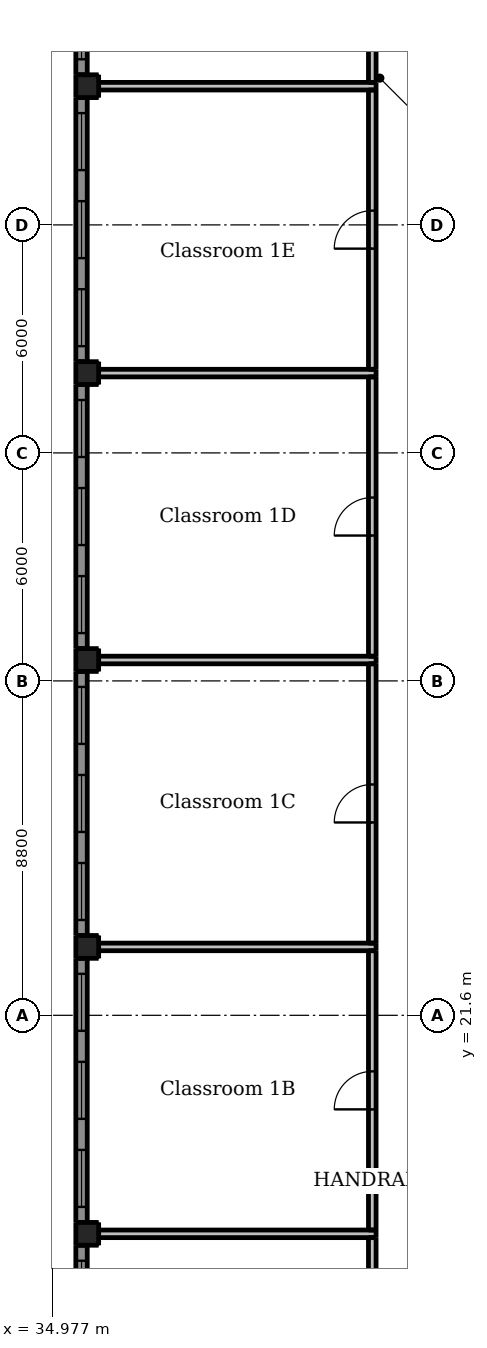
"""IFC4 building model, lengths in metres.
Left out: names, types, materials, properties, quantities, classifications, styles, units other than length and angle.
Written with IfcOpenShell. Run it as: python <this file> out.ifc"""

import sys

from ifc_helpers import new_model, si_unit, direction, frame, frame_2d, origin, origin_2d, place, context, subcontext, project, spatial, rectangle, extrude, element, fill, save


model = new_model("IFC4")
c1 = context("Model", 3, precision=1e-05, world=origin(), true_north=direction((0.0, 1.0)))
c2 = subcontext(c1, "Body", "Model", "MODEL_VIEW")
j1 = project(units=[si_unit("LENGTHUNIT", "METRE"), si_unit("PLANEANGLEUNIT", "RADIAN")], contexts=[c1])
p1 = place(None, origin())
s1 = spatial("IfcSite", under=j1, at=p1, CompositionType="ELEMENT")
p2 = place(p1, origin())
s2 = spatial("IfcBuilding", under=s1, at=p2, CompositionType="ELEMENT")
p3 = place(p2, frame((0.0, 0.0, 5.5)))
s3 = spatial("IfcBuildingStorey", under=s2, at=p3, CompositionType="ELEMENT", Elevation=5.5)
for number, where, z_axis, x_axis in (
    (1, (35.9, 15.85, -0.3), (0.0, 0.0, 1.0), (1.0, 0.0, 0.0)),
    (2, (35.9, 23.4, -0.3), (0.0, 0.0, 1.0), (1.0, 0.0, 0.0)),
    (3, (35.9, 30.95, -0.3), (0.0, 0.0, 1.0), (1.0, 0.0, 0.0)),
    (4, (35.9, 38.5, -0.3), (0.0, 0.0, 1.0), (1.0, 0.0, 0.0)),
    (5, (35.9, 46.05, -0.3), (0.0, 0.0, 1.0), (1.0, 0.0, 0.0)),
):
    element("IfcColumn", number, at=place(p3, frame(where, z_axis=z_axis, x_axis=x_axis)), inside=s3, PredefinedType="COLUMN", context=c2, shape_type="SweptSolid", body=[
        extrude(rectangle(XDim=0.6, YDim=0.6, at=origin_2d()), origin(), (0.0, 0.0, 1.0), 4.5),
    ])
p4 = place(p3, frame((35.75, 8.6, 0.0), z_axis=(0.0, 0.0, 1.0), x_axis=(0.0, 1.0, 0.0)))
e6 = element("IfcWall", 6, at=p4, inside=s3, PredefinedType="SOLIDWALL", context=c2, shape_type="SweptSolid", body=[
    extrude(rectangle(XDim=6.95, YDim=0.3, at=frame_2d((3.475, 0.0))), origin(), (0.0, 0.0, 1.0), 3.3),
])
p5 = place(p4, frame((0.408, 0.0, 0.9)))
e7 = element("IfcOpeningElement", 7, at=p5, cuts=e6, PredefinedType="OPENING", context=c2, shape_type="SweptSolid", body=[
    extrude(rectangle(XDim=1.5, YDim=1.5, at=frame_2d((0.75, 0.75))), frame((0.0, 0.16, 0.0), z_axis=(0.0, -1.0, 0.0), x_axis=(1.0, 0.0, 0.0)), (0.0, 0.0, 1.0), 0.32),
])
p6 = place(p4, frame((2.725, 0.0, 0.9)))
e8 = element("IfcOpeningElement", 8, at=p6, cuts=e6, PredefinedType="OPENING", context=c2, shape_type="SweptSolid", body=[
    extrude(rectangle(XDim=1.5, YDim=1.5, at=frame_2d((0.75, 0.75))), frame((0.0, 0.16, 0.0), z_axis=(0.0, -1.0, 0.0), x_axis=(1.0, 0.0, 0.0)), (0.0, 0.0, 1.0), 0.32),
])
p7 = place(p4, frame((5.042, 0.0, 0.9)))
e9 = element("IfcOpeningElement", 9, at=p7, cuts=e6, PredefinedType="OPENING", context=c2, shape_type="SweptSolid", body=[
    extrude(rectangle(XDim=1.5, YDim=1.5, at=frame_2d((0.75, 0.75))), frame((0.0, 0.16, 0.0), z_axis=(0.0, -1.0, 0.0), x_axis=(1.0, 0.0, 0.0)), (0.0, 0.0, 1.0), 0.32),
])
p8 = place(p3, frame((35.75, 16.15, 0.0), z_axis=(0.0, 0.0, 1.0), x_axis=(0.0, 1.0, 0.0)))
e10 = element("IfcWall", 10, at=p8, inside=s3, PredefinedType="SOLIDWALL", context=c2, shape_type="SweptSolid", body=[
    extrude(rectangle(XDim=6.95, YDim=0.3, at=frame_2d((3.475, 0.0))), origin(), (0.0, 0.0, 1.0), 3.3),
])
p9 = place(p8, frame((0.408, 0.0, 0.9)))
e11 = element("IfcOpeningElement", 11, at=p9, cuts=e10, PredefinedType="OPENING", context=c2, shape_type="SweptSolid", body=[
    extrude(rectangle(XDim=1.5, YDim=1.5, at=frame_2d((0.75, 0.75))), frame((0.0, 0.16, 0.0), z_axis=(0.0, -1.0, 0.0), x_axis=(1.0, 0.0, 0.0)), (0.0, 0.0, 1.0), 0.32),
])
p10 = place(p8, frame((2.725, 0.0, 0.9)))
e12 = element("IfcOpeningElement", 12, at=p10, cuts=e10, PredefinedType="OPENING", context=c2, shape_type="SweptSolid", body=[
    extrude(rectangle(XDim=1.5, YDim=1.5, at=frame_2d((0.75, 0.75))), frame((0.0, 0.16, 0.0), z_axis=(0.0, -1.0, 0.0), x_axis=(1.0, 0.0, 0.0)), (0.0, 0.0, 1.0), 0.32),
])
p11 = place(p8, frame((5.042, 0.0, 0.9)))
e13 = element("IfcOpeningElement", 13, at=p11, cuts=e10, PredefinedType="OPENING", context=c2, shape_type="SweptSolid", body=[
    extrude(rectangle(XDim=1.5, YDim=1.5, at=frame_2d((0.75, 0.75))), frame((0.0, 0.16, 0.0), z_axis=(0.0, -1.0, 0.0), x_axis=(1.0, 0.0, 0.0)), (0.0, 0.0, 1.0), 0.32),
])
p12 = place(p3, frame((35.75, 23.7, 0.0), z_axis=(0.0, 0.0, 1.0), x_axis=(0.0, 1.0, 0.0)))
e14 = element("IfcWall", 14, at=p12, inside=s3, PredefinedType="SOLIDWALL", context=c2, shape_type="SweptSolid", body=[
    extrude(rectangle(XDim=6.95, YDim=0.3, at=frame_2d((3.475, 0.0))), origin(), (0.0, 0.0, 1.0), 3.3),
])
p13 = place(p12, frame((0.408, 0.0, 0.9)))
e15 = element("IfcOpeningElement", 15, at=p13, cuts=e14, PredefinedType="OPENING", context=c2, shape_type="SweptSolid", body=[
    extrude(rectangle(XDim=1.5, YDim=1.5, at=frame_2d((0.75, 0.75))), frame((0.0, 0.16, 0.0), z_axis=(0.0, -1.0, 0.0), x_axis=(1.0, 0.0, 0.0)), (0.0, 0.0, 1.0), 0.32),
])
p14 = place(p12, frame((2.725, 0.0, 0.9)))
e16 = element("IfcOpeningElement", 16, at=p14, cuts=e14, PredefinedType="OPENING", context=c2, shape_type="SweptSolid", body=[
    extrude(rectangle(XDim=1.5, YDim=1.5, at=frame_2d((0.75, 0.75))), frame((0.0, 0.16, 0.0), z_axis=(0.0, -1.0, 0.0), x_axis=(1.0, 0.0, 0.0)), (0.0, 0.0, 1.0), 0.32),
])
p15 = place(p12, frame((5.042, 0.0, 0.9)))
e17 = element("IfcOpeningElement", 17, at=p15, cuts=e14, PredefinedType="OPENING", context=c2, shape_type="SweptSolid", body=[
    extrude(rectangle(XDim=1.5, YDim=1.5, at=frame_2d((0.75, 0.75))), frame((0.0, 0.16, 0.0), z_axis=(0.0, -1.0, 0.0), x_axis=(1.0, 0.0, 0.0)), (0.0, 0.0, 1.0), 0.32),
])
p16 = place(p3, frame((35.75, 31.25, 0.0), z_axis=(0.0, 0.0, 1.0), x_axis=(0.0, 1.0, 0.0)))
e18 = element("IfcWall", 18, at=p16, inside=s3, PredefinedType="SOLIDWALL", context=c2, shape_type="SweptSolid", body=[
    extrude(rectangle(XDim=6.95, YDim=0.3, at=frame_2d((3.475, 0.0))), origin(), (0.0, 0.0, 1.0), 3.3),
])
p17 = place(p16, frame((0.408, 0.0, 0.9)))
e19 = element("IfcOpeningElement", 19, at=p17, cuts=e18, PredefinedType="OPENING", context=c2, shape_type="SweptSolid", body=[
    extrude(rectangle(XDim=1.5, YDim=1.5, at=frame_2d((0.75, 0.75))), frame((0.0, 0.16, 0.0), z_axis=(0.0, -1.0, 0.0), x_axis=(1.0, 0.0, 0.0)), (0.0, 0.0, 1.0), 0.32),
])
p18 = place(p16, frame((2.725, 0.0, 0.9)))
e20 = element("IfcOpeningElement", 20, at=p18, cuts=e18, PredefinedType="OPENING", context=c2, shape_type="SweptSolid", body=[
    extrude(rectangle(XDim=1.5, YDim=1.5, at=frame_2d((0.75, 0.75))), frame((0.0, 0.16, 0.0), z_axis=(0.0, -1.0, 0.0), x_axis=(1.0, 0.0, 0.0)), (0.0, 0.0, 1.0), 0.32),
])
p19 = place(p16, frame((5.042, 0.0, 0.9)))
e21 = element("IfcOpeningElement", 21, at=p19, cuts=e18, PredefinedType="OPENING", context=c2, shape_type="SweptSolid", body=[
    extrude(rectangle(XDim=1.5, YDim=1.5, at=frame_2d((0.75, 0.75))), frame((0.0, 0.16, 0.0), z_axis=(0.0, -1.0, 0.0), x_axis=(1.0, 0.0, 0.0)), (0.0, 0.0, 1.0), 0.32),
])
p20 = place(p3, frame((35.75, 38.8, 0.0), z_axis=(0.0, 0.0, 1.0), x_axis=(0.0, 1.0, 0.0)))
e22 = element("IfcWall", 22, at=p20, inside=s3, PredefinedType="SOLIDWALL", context=c2, shape_type="SweptSolid", body=[
    extrude(rectangle(XDim=6.95, YDim=0.3, at=frame_2d((3.475, 0.0))), origin(), (0.0, 0.0, 1.0), 3.3),
])
p21 = place(p20, frame((0.408, 0.0, 0.9)))
e23 = element("IfcOpeningElement", 23, at=p21, cuts=e22, PredefinedType="OPENING", context=c2, shape_type="SweptSolid", body=[
    extrude(rectangle(XDim=1.5, YDim=1.5, at=frame_2d((0.75, 0.75))), frame((0.0, 0.16, 0.0), z_axis=(0.0, -1.0, 0.0), x_axis=(1.0, 0.0, 0.0)), (0.0, 0.0, 1.0), 0.32),
])
p22 = place(p20, frame((2.725, 0.0, 0.9)))
e24 = element("IfcOpeningElement", 24, at=p22, cuts=e22, PredefinedType="OPENING", context=c2, shape_type="SweptSolid", body=[
    extrude(rectangle(XDim=1.5, YDim=1.5, at=frame_2d((0.75, 0.75))), frame((0.0, 0.16, 0.0), z_axis=(0.0, -1.0, 0.0), x_axis=(1.0, 0.0, 0.0)), (0.0, 0.0, 1.0), 0.32),
])
p23 = place(p20, frame((5.042, 0.0, 0.9)))
e25 = element("IfcOpeningElement", 25, at=p23, cuts=e22, PredefinedType="OPENING", context=c2, shape_type="SweptSolid", body=[
    extrude(rectangle(XDim=1.5, YDim=1.5, at=frame_2d((0.75, 0.75))), frame((0.0, 0.16, 0.0), z_axis=(0.0, -1.0, 0.0), x_axis=(1.0, 0.0, 0.0)), (0.0, 0.0, 1.0), 0.32),
])
p24 = place(p3, frame((35.75, 46.35, 0.0), z_axis=(0.0, 0.0, 1.0), x_axis=(0.0, 1.0, 0.0)))
e26 = element("IfcWall", 26, at=p24, inside=s3, PredefinedType="SOLIDWALL", context=c2, shape_type="SweptSolid", body=[
    extrude(rectangle(XDim=6.95, YDim=0.3, at=frame_2d((3.475, 0.0))), origin(), (0.0, 0.0, 1.0), 3.3),
])
p25 = place(p24, frame((0.408, 0.0, 0.9)))
e27 = element("IfcOpeningElement", 27, at=p25, cuts=e26, PredefinedType="OPENING", context=c2, shape_type="SweptSolid", body=[
    extrude(rectangle(XDim=1.5, YDim=1.5, at=frame_2d((0.75, 0.75))), frame((0.0, 0.16, 0.0), z_axis=(0.0, -1.0, 0.0), x_axis=(1.0, 0.0, 0.0)), (0.0, 0.0, 1.0), 0.32),
])
p26 = place(p24, frame((2.725, 0.0, 0.9)))
e28 = element("IfcOpeningElement", 28, at=p26, cuts=e26, PredefinedType="OPENING", context=c2, shape_type="SweptSolid", body=[
    extrude(rectangle(XDim=1.5, YDim=1.5, at=frame_2d((0.75, 0.75))), frame((0.0, 0.16, 0.0), z_axis=(0.0, -1.0, 0.0), x_axis=(1.0, 0.0, 0.0)), (0.0, 0.0, 1.0), 0.32),
])
p27 = place(p24, frame((5.042, 0.0, 0.9)))
e29 = element("IfcOpeningElement", 29, at=p27, cuts=e26, PredefinedType="OPENING", context=c2, shape_type="SweptSolid", body=[
    extrude(rectangle(XDim=1.5, YDim=1.5, at=frame_2d((0.75, 0.75))), frame((0.0, 0.16, 0.0), z_axis=(0.0, -1.0, 0.0), x_axis=(1.0, 0.0, 0.0)), (0.0, 0.0, 1.0), 0.32),
])
p28 = place(p3, frame((43.4, 8.3, 0.0), z_axis=(0.0, 0.0, 1.0), x_axis=(0.0, 1.0, 0.0)))
e30 = element("IfcWall", 30, at=p28, inside=s3, PredefinedType="PARTITIONING", context=c2, shape_type="SweptSolid", body=[
    extrude(rectangle(XDim=7.45, YDim=0.2, at=frame_2d((3.725, 0.0))), origin(), (0.0, 0.0, 1.0), 3.1),
])
p29 = place(p28, frame((3.225, 0.0, 0.0)))
e31 = element("IfcOpeningElement", 31, at=p29, cuts=e30, PredefinedType="OPENING", context=c2, shape_type="SweptSolid", body=[
    extrude(rectangle(XDim=1.0, YDim=2.1, at=frame_2d((0.5, 1.05))), frame((0.0, 0.11, 0.0), z_axis=(0.0, -1.0, 0.0), x_axis=(1.0, 0.0, 0.0)), (0.0, 0.0, 1.0), 0.22),
])
p30 = place(p3, frame((43.4, 15.95, 0.0), z_axis=(0.0, 0.0, 1.0), x_axis=(0.0, 1.0, 0.0)))
e32 = element("IfcWall", 32, at=p30, inside=s3, PredefinedType="PARTITIONING", context=c2, shape_type="SweptSolid", body=[
    extrude(rectangle(XDim=7.35, YDim=0.2, at=frame_2d((3.675, 0.0))), origin(), (0.0, 0.0, 1.0), 3.1),
])
p31 = place(p30, frame((3.175, 0.0, 0.0)))
e33 = element("IfcOpeningElement", 33, at=p31, cuts=e32, PredefinedType="OPENING", context=c2, shape_type="SweptSolid", body=[
    extrude(rectangle(XDim=1.0, YDim=2.1, at=frame_2d((0.5, 1.05))), frame((0.0, 0.11, 0.0), z_axis=(0.0, -1.0, 0.0), x_axis=(1.0, 0.0, 0.0)), (0.0, 0.0, 1.0), 0.22),
])
p32 = place(p3, frame((43.4, 23.5, 0.0), z_axis=(0.0, 0.0, 1.0), x_axis=(0.0, 1.0, 0.0)))
e34 = element("IfcWall", 34, at=p32, inside=s3, PredefinedType="PARTITIONING", context=c2, shape_type="SweptSolid", body=[
    extrude(rectangle(XDim=7.35, YDim=0.2, at=frame_2d((3.675, 0.0))), origin(), (0.0, 0.0, 1.0), 3.1),
])
p33 = place(p32, frame((3.175, 0.0, 0.0)))
e35 = element("IfcOpeningElement", 35, at=p33, cuts=e34, PredefinedType="OPENING", context=c2, shape_type="SweptSolid", body=[
    extrude(rectangle(XDim=1.0, YDim=2.1, at=frame_2d((0.5, 1.05))), frame((0.0, 0.11, 0.0), z_axis=(0.0, -1.0, 0.0), x_axis=(1.0, 0.0, 0.0)), (0.0, 0.0, 1.0), 0.22),
])
p34 = place(p3, frame((43.4, 31.05, 0.0), z_axis=(0.0, 0.0, 1.0), x_axis=(0.0, 1.0, 0.0)))
e36 = element("IfcWall", 36, at=p34, inside=s3, PredefinedType="PARTITIONING", context=c2, shape_type="SweptSolid", body=[
    extrude(rectangle(XDim=7.35, YDim=0.2, at=frame_2d((3.675, 0.0))), origin(), (0.0, 0.0, 1.0), 3.1),
])
p35 = place(p34, frame((3.175, 0.0, 0.0)))
e37 = element("IfcOpeningElement", 37, at=p35, cuts=e36, PredefinedType="OPENING", context=c2, shape_type="SweptSolid", body=[
    extrude(rectangle(XDim=1.0, YDim=2.1, at=frame_2d((0.5, 1.05))), frame((0.0, 0.11, 0.0), z_axis=(0.0, -1.0, 0.0), x_axis=(1.0, 0.0, 0.0)), (0.0, 0.0, 1.0), 0.22),
])
p36 = place(p3, frame((43.4, 38.6, 0.0), z_axis=(0.0, 0.0, 1.0), x_axis=(0.0, 1.0, 0.0)))
e38 = element("IfcWall", 38, at=p36, inside=s3, PredefinedType="PARTITIONING", context=c2, shape_type="SweptSolid", body=[
    extrude(rectangle(XDim=7.35, YDim=0.2, at=frame_2d((3.675, 0.0))), origin(), (0.0, 0.0, 1.0), 3.1),
])
p37 = place(p36, frame((3.175, 0.0, 0.0)))
e39 = element("IfcOpeningElement", 39, at=p37, cuts=e38, PredefinedType="OPENING", context=c2, shape_type="SweptSolid", body=[
    extrude(rectangle(XDim=1.0, YDim=2.1, at=frame_2d((0.5, 1.05))), frame((0.0, 0.11, 0.0), z_axis=(0.0, -1.0, 0.0), x_axis=(1.0, 0.0, 0.0)), (0.0, 0.0, 1.0), 0.22),
])
p38 = place(p3, frame((43.4, 46.15, 0.0), z_axis=(0.0, 0.0, 1.0), x_axis=(0.0, 1.0, 0.0)))
e40 = element("IfcWall", 40, at=p38, inside=s3, PredefinedType="PARTITIONING", context=c2, shape_type="SweptSolid", body=[
    extrude(rectangle(XDim=7.35, YDim=0.2, at=frame_2d((3.675, 0.0))), origin(), (0.0, 0.0, 1.0), 3.1),
])
p39 = place(p38, frame((3.175, 0.0, 0.0)))
e41 = element("IfcOpeningElement", 41, at=p39, cuts=e40, PredefinedType="OPENING", context=c2, shape_type="SweptSolid", body=[
    extrude(rectangle(XDim=1.0, YDim=2.1, at=frame_2d((0.5, 1.05))), frame((0.0, 0.11, 0.0), z_axis=(0.0, -1.0, 0.0), x_axis=(1.0, 0.0, 0.0)), (0.0, 0.0, 1.0), 0.22),
])
for number, where, z_axis, x_axis in (
    (42, (36.2, 15.85, 0.0), (0.0, 0.0, 1.0), (1.0, 0.0, 0.0)),
    (43, (36.2, 23.4, 0.0), (0.0, 0.0, 1.0), (1.0, 0.0, 0.0)),
    (44, (36.2, 30.95, 0.0), (0.0, 0.0, 1.0), (1.0, 0.0, 0.0)),
    (45, (36.2, 38.5, 0.0), (0.0, 0.0, 1.0), (1.0, 0.0, 0.0)),
    (46, (36.2, 46.05, 0.0), (0.0, 0.0, 1.0), (1.0, 0.0, 0.0)),
):
    element("IfcWall", number, at=place(p3, frame(where, z_axis=z_axis, x_axis=x_axis)), inside=s3, PredefinedType="PARTITIONING", context=c2, shape_type="SweptSolid", body=[
        extrude(rectangle(XDim=7.3, YDim=0.2, at=frame_2d((3.65, 0.0))), origin(), (0.0, 0.0, 1.0), 3.1),
    ])
p40 = place(p7, origin())
e47 = element("IfcWindow", 47, at=p40, inside=s3, PartitioningType="DOUBLE_PANEL_HORIZONTAL", PredefinedType="WINDOW", context=c2, shape_type="SweptSolid", body=[
    extrude(rectangle(XDim=1.5, YDim=1.5, at=frame_2d((0.75, 0.75))), frame((0.0, 0.03, 0.0), z_axis=(0.0, -1.0, 0.0), x_axis=(1.0, 0.0, 0.0)), (0.0, 0.0, 1.0), 0.06),
])
fill(e9, e47)
p41 = place(p9, origin())
e48 = element("IfcWindow", 48, at=p41, inside=s3, PartitioningType="DOUBLE_PANEL_HORIZONTAL", PredefinedType="WINDOW", context=c2, shape_type="SweptSolid", body=[
    extrude(rectangle(XDim=1.5, YDim=1.5, at=frame_2d((0.75, 0.75))), frame((0.0, 0.03, 0.0), z_axis=(0.0, -1.0, 0.0), x_axis=(1.0, 0.0, 0.0)), (0.0, 0.0, 1.0), 0.06),
])
fill(e11, e48)
p42 = place(p10, origin())
e49 = element("IfcWindow", 49, at=p42, inside=s3, PartitioningType="DOUBLE_PANEL_HORIZONTAL", PredefinedType="WINDOW", context=c2, shape_type="SweptSolid", body=[
    extrude(rectangle(XDim=1.5, YDim=1.5, at=frame_2d((0.75, 0.75))), frame((0.0, 0.03, 0.0), z_axis=(0.0, -1.0, 0.0), x_axis=(1.0, 0.0, 0.0)), (0.0, 0.0, 1.0), 0.06),
])
fill(e12, e49)
p43 = place(p11, origin())
e50 = element("IfcWindow", 50, at=p43, inside=s3, PartitioningType="DOUBLE_PANEL_HORIZONTAL", PredefinedType="WINDOW", context=c2, shape_type="SweptSolid", body=[
    extrude(rectangle(XDim=1.5, YDim=1.5, at=frame_2d((0.75, 0.75))), frame((0.0, 0.03, 0.0), z_axis=(0.0, -1.0, 0.0), x_axis=(1.0, 0.0, 0.0)), (0.0, 0.0, 1.0), 0.06),
])
fill(e13, e50)
p44 = place(p13, origin())
e51 = element("IfcWindow", 51, at=p44, inside=s3, PartitioningType="DOUBLE_PANEL_HORIZONTAL", PredefinedType="WINDOW", context=c2, shape_type="SweptSolid", body=[
    extrude(rectangle(XDim=1.5, YDim=1.5, at=frame_2d((0.75, 0.75))), frame((0.0, 0.03, 0.0), z_axis=(0.0, -1.0, 0.0), x_axis=(1.0, 0.0, 0.0)), (0.0, 0.0, 1.0), 0.06),
])
fill(e15, e51)
p45 = place(p14, origin())
e52 = element("IfcWindow", 52, at=p45, inside=s3, PartitioningType="DOUBLE_PANEL_HORIZONTAL", PredefinedType="WINDOW", context=c2, shape_type="SweptSolid", body=[
    extrude(rectangle(XDim=1.5, YDim=1.5, at=frame_2d((0.75, 0.75))), frame((0.0, 0.03, 0.0), z_axis=(0.0, -1.0, 0.0), x_axis=(1.0, 0.0, 0.0)), (0.0, 0.0, 1.0), 0.06),
])
fill(e16, e52)
p46 = place(p15, origin())
e53 = element("IfcWindow", 53, at=p46, inside=s3, PartitioningType="DOUBLE_PANEL_HORIZONTAL", PredefinedType="WINDOW", context=c2, shape_type="SweptSolid", body=[
    extrude(rectangle(XDim=1.5, YDim=1.5, at=frame_2d((0.75, 0.75))), frame((0.0, 0.03, 0.0), z_axis=(0.0, -1.0, 0.0), x_axis=(1.0, 0.0, 0.0)), (0.0, 0.0, 1.0), 0.06),
])
fill(e17, e53)
p47 = place(p17, origin())
e54 = element("IfcWindow", 54, at=p47, inside=s3, PartitioningType="DOUBLE_PANEL_HORIZONTAL", PredefinedType="WINDOW", context=c2, shape_type="SweptSolid", body=[
    extrude(rectangle(XDim=1.5, YDim=1.5, at=frame_2d((0.75, 0.75))), frame((0.0, 0.03, 0.0), z_axis=(0.0, -1.0, 0.0), x_axis=(1.0, 0.0, 0.0)), (0.0, 0.0, 1.0), 0.06),
])
fill(e19, e54)
p48 = place(p18, origin())
e55 = element("IfcWindow", 55, at=p48, inside=s3, PartitioningType="DOUBLE_PANEL_HORIZONTAL", PredefinedType="WINDOW", context=c2, shape_type="SweptSolid", body=[
    extrude(rectangle(XDim=1.5, YDim=1.5, at=frame_2d((0.75, 0.75))), frame((0.0, 0.03, 0.0), z_axis=(0.0, -1.0, 0.0), x_axis=(1.0, 0.0, 0.0)), (0.0, 0.0, 1.0), 0.06),
])
fill(e20, e55)
p49 = place(p19, origin())
e56 = element("IfcWindow", 56, at=p49, inside=s3, PartitioningType="DOUBLE_PANEL_HORIZONTAL", PredefinedType="WINDOW", context=c2, shape_type="SweptSolid", body=[
    extrude(rectangle(XDim=1.5, YDim=1.5, at=frame_2d((0.75, 0.75))), frame((0.0, 0.03, 0.0), z_axis=(0.0, -1.0, 0.0), x_axis=(1.0, 0.0, 0.0)), (0.0, 0.0, 1.0), 0.06),
])
fill(e21, e56)
p50 = place(p21, origin())
e57 = element("IfcWindow", 57, at=p50, inside=s3, PartitioningType="DOUBLE_PANEL_HORIZONTAL", PredefinedType="WINDOW", context=c2, shape_type="SweptSolid", body=[
    extrude(rectangle(XDim=1.5, YDim=1.5, at=frame_2d((0.75, 0.75))), frame((0.0, 0.03, 0.0), z_axis=(0.0, -1.0, 0.0), x_axis=(1.0, 0.0, 0.0)), (0.0, 0.0, 1.0), 0.06),
])
fill(e23, e57)
p51 = place(p22, origin())
e58 = element("IfcWindow", 58, at=p51, inside=s3, PartitioningType="DOUBLE_PANEL_HORIZONTAL", PredefinedType="WINDOW", context=c2, shape_type="SweptSolid", body=[
    extrude(rectangle(XDim=1.5, YDim=1.5, at=frame_2d((0.75, 0.75))), frame((0.0, 0.03, 0.0), z_axis=(0.0, -1.0, 0.0), x_axis=(1.0, 0.0, 0.0)), (0.0, 0.0, 1.0), 0.06),
])
fill(e24, e58)
p52 = place(p23, origin())
e59 = element("IfcWindow", 59, at=p52, inside=s3, PartitioningType="DOUBLE_PANEL_HORIZONTAL", PredefinedType="WINDOW", context=c2, shape_type="SweptSolid", body=[
    extrude(rectangle(XDim=1.5, YDim=1.5, at=frame_2d((0.75, 0.75))), frame((0.0, 0.03, 0.0), z_axis=(0.0, -1.0, 0.0), x_axis=(1.0, 0.0, 0.0)), (0.0, 0.0, 1.0), 0.06),
])
fill(e25, e59)
p53 = place(p25, origin())
e60 = element("IfcWindow", 60, at=p53, inside=s3, PartitioningType="DOUBLE_PANEL_HORIZONTAL", PredefinedType="WINDOW", context=c2, shape_type="SweptSolid", body=[
    extrude(rectangle(XDim=1.5, YDim=1.5, at=frame_2d((0.75, 0.75))), frame((0.0, 0.03, 0.0), z_axis=(0.0, -1.0, 0.0), x_axis=(1.0, 0.0, 0.0)), (0.0, 0.0, 1.0), 0.06),
])
fill(e27, e60)
p54 = place(p31, origin())
e61 = element("IfcDoor", 61, at=p54, inside=s3, OperationType="SINGLE_SWING_LEFT", PredefinedType="DOOR", context=c2, shape_type="SweptSolid", body=[
    extrude(rectangle(XDim=1.0, YDim=2.1, at=frame_2d((0.5, 1.05))), frame((0.0, 0.025, 0.0), z_axis=(0.0, -1.0, 0.0), x_axis=(1.0, 0.0, 0.0)), (0.0, 0.0, 1.0), 0.05),
])
fill(e33, e61)
p55 = place(p33, origin())
e62 = element("IfcDoor", 62, at=p55, inside=s3, OperationType="SINGLE_SWING_LEFT", PredefinedType="DOOR", context=c2, shape_type="SweptSolid", body=[
    extrude(rectangle(XDim=1.0, YDim=2.1, at=frame_2d((0.5, 1.05))), frame((0.0, 0.025, 0.0), z_axis=(0.0, -1.0, 0.0), x_axis=(1.0, 0.0, 0.0)), (0.0, 0.0, 1.0), 0.05),
])
fill(e35, e62)
p56 = place(p35, origin())
e63 = element("IfcDoor", 63, at=p56, inside=s3, OperationType="SINGLE_SWING_LEFT", PredefinedType="DOOR", context=c2, shape_type="SweptSolid", body=[
    extrude(rectangle(XDim=1.0, YDim=2.1, at=frame_2d((0.5, 1.05))), frame((0.0, 0.025, 0.0), z_axis=(0.0, -1.0, 0.0), x_axis=(1.0, 0.0, 0.0)), (0.0, 0.0, 1.0), 0.05),
])
fill(e37, e63)
p57 = place(p37, origin())
e64 = element("IfcDoor", 64, at=p57, inside=s3, OperationType="SINGLE_SWING_LEFT", PredefinedType="DOOR", context=c2, shape_type="SweptSolid", body=[
    extrude(rectangle(XDim=1.0, YDim=2.1, at=frame_2d((0.5, 1.05))), frame((0.0, 0.025, 0.0), z_axis=(0.0, -1.0, 0.0), x_axis=(1.0, 0.0, 0.0)), (0.0, 0.0, 1.0), 0.05),
])
fill(e39, e64)
save(model, sys.argv[1])
